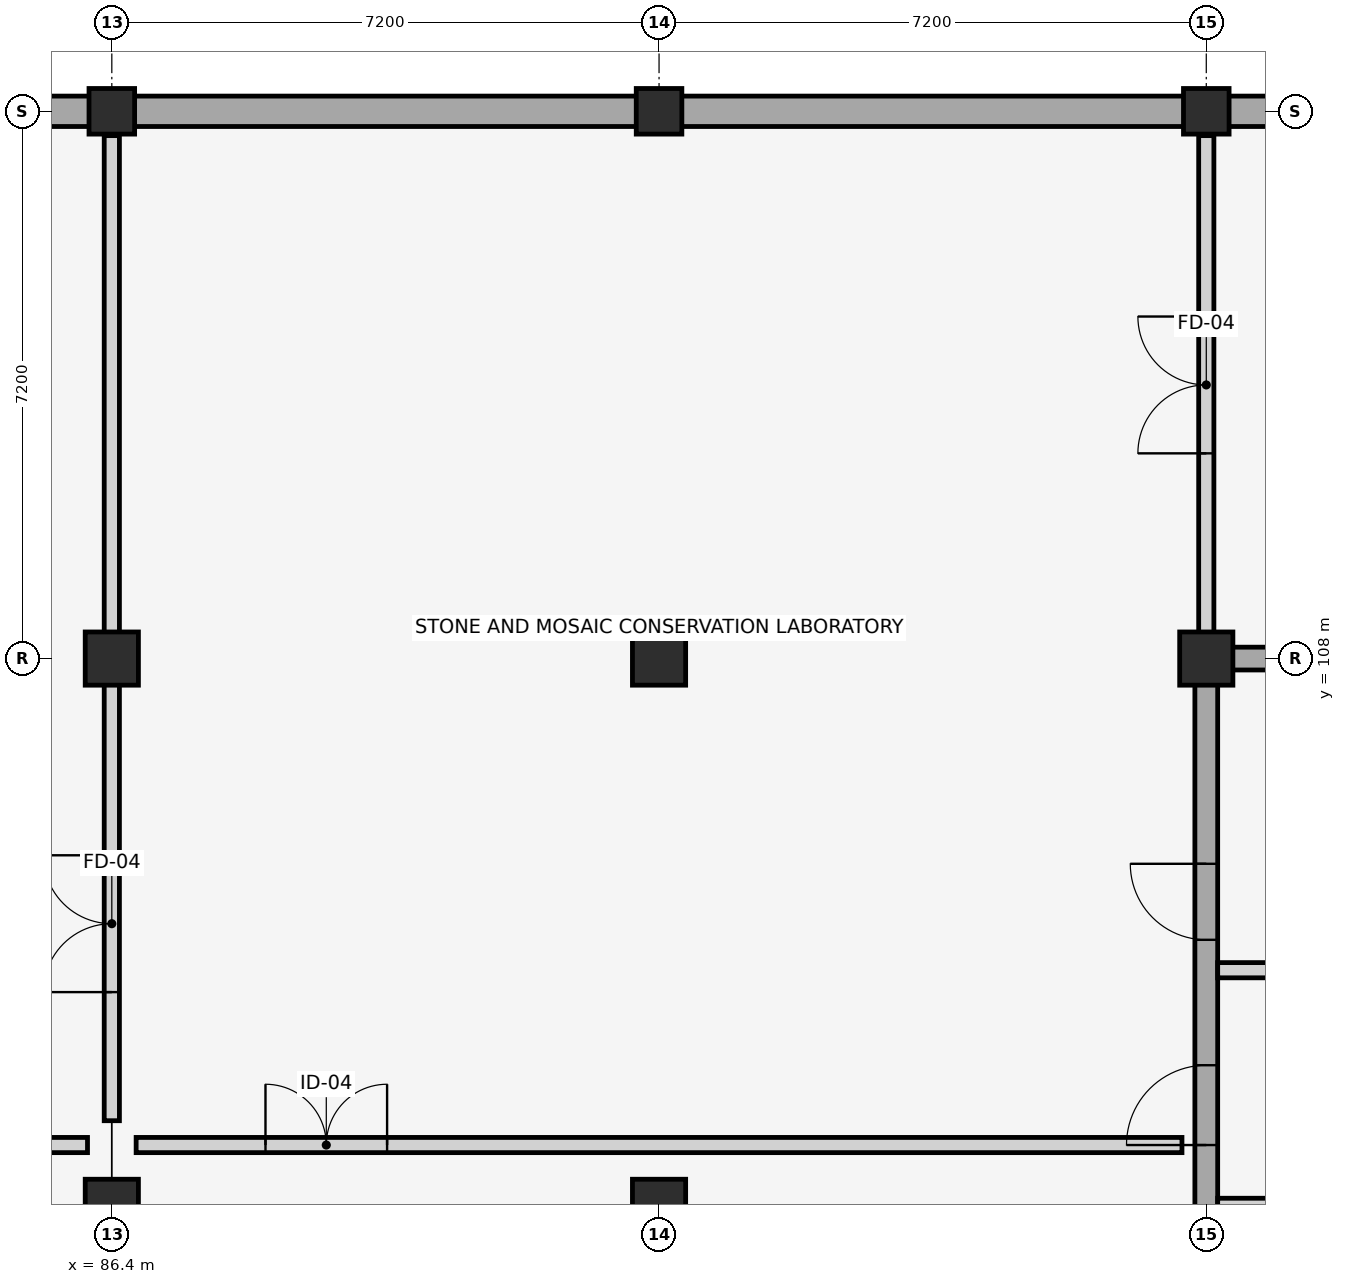
"""IFC4 building model, lengths in metres.
Left out: names, types, materials, properties, quantities, classifications, styles, units other than length and angle.
Written with IfcOpenShell. Run it as: python <this file> out.ifc"""

import sys

from ifc_helpers import new_model, si_unit, direction, frame, frame_2d, origin, origin_2d, place, context, subcontext, project, spatial, rectangle, extrude, element, fill, save


model = new_model("IFC4")
c1 = context("Model", 3, precision=1e-05, world=origin(), true_north=direction((0.0, 1.0)))
c2 = subcontext(c1, "Body", "Model", "MODEL_VIEW")
j1 = project(units=[si_unit("LENGTHUNIT", "METRE"), si_unit("PLANEANGLEUNIT", "RADIAN")], contexts=[c1])
p1 = place(None, origin())
s1 = spatial("IfcSite", under=j1, at=p1, CompositionType="ELEMENT")
p2 = place(p1, origin())
s2 = spatial("IfcBuilding", under=s1, at=p2, CompositionType="ELEMENT")
p3 = place(p2, frame((0.0, 0.0, -4.5)))
s3 = spatial("IfcBuildingStorey", under=s2, at=p3, CompositionType="ELEMENT", Elevation=-4.5)
p4 = place(p3, frame((108.2, 115.2, 0.0), z_axis=(0.0, 0.0, 1.0), x_axis=(-1.0, 0.0, 0.0)))
e1 = element("IfcWall", 1, at=p4, inside=s3, PredefinedType="USERDEFINED", context=c2, shape_type="SweptSolid", body=[
    extrude(rectangle(XDim=50.8, YDim=0.4, at=frame_2d((25.4, 0.0))), origin(), (0.0, 0.0, 1.0), 3.67),
])
for number, where, z_axis, x_axis in (
    (2, (86.4, 100.8, -0.45), (0.0, 0.0, 1.0), (1.0, 0.0, 0.0)),
    (3, (86.4, 108.0, -0.45), (0.0, 0.0, 1.0), (0.0, 1.0, 0.0)),
):
    element("IfcColumn", number, at=place(p3, frame(where, z_axis=z_axis, x_axis=x_axis)), inside=s3, PredefinedType="COLUMN", context=c2, shape_type="SweptSolid", body=[
        extrude(rectangle(XDim=0.7, YDim=0.7, at=origin_2d()), origin(), (0.0, 0.0, 1.0), 4.95),
    ])
p5 = place(p3, frame((86.4, 115.2, -0.45), z_axis=(0.0, 0.0, 1.0), x_axis=(1.0, 0.0, 0.0)))
e4 = element("IfcColumn", 4, at=p5, inside=s3, PredefinedType="COLUMN", context=c2, shape_type="SweptSolid", body=[
    extrude(rectangle(XDim=0.6, YDim=0.6, at=origin_2d()), origin(), (0.0, 0.0, 1.0), 4.95),
])
for number, where, z_axis, x_axis in (
    (5, (93.6, 100.8, -0.45), (0.0, 0.0, 1.0), (0.0, 1.0, 0.0)),
    (6, (93.6, 108.0, -0.45), (0.0, 0.0, 1.0), (1.0, 0.0, 0.0)),
):
    element("IfcColumn", number, at=place(p3, frame(where, z_axis=z_axis, x_axis=x_axis)), inside=s3, PredefinedType="COLUMN", context=c2, shape_type="SweptSolid", body=[
        extrude(rectangle(XDim=0.7, YDim=0.7, at=origin_2d()), origin(), (0.0, 0.0, 1.0), 4.95),
    ])
p6 = place(p3, frame((93.6, 115.2, -0.45), z_axis=(0.0, 0.0, 1.0), x_axis=(0.0, 1.0, 0.0)))
e7 = element("IfcColumn", 7, at=p6, inside=s3, PredefinedType="COLUMN", context=c2, shape_type="SweptSolid", body=[
    extrude(rectangle(XDim=0.6, YDim=0.6, at=origin_2d()), origin(), (0.0, 0.0, 1.0), 4.95),
])
p7 = place(p3, frame((100.8, 108.0, -0.45), z_axis=(0.0, 0.0, 1.0), x_axis=(0.0, 1.0, 0.0)))
e8 = element("IfcColumn", 8, at=p7, inside=s3, PredefinedType="COLUMN", context=c2, shape_type="SweptSolid", body=[
    extrude(rectangle(XDim=0.7, YDim=0.7, at=origin_2d()), origin(), (0.0, 0.0, 1.0), 4.95),
])
p8 = place(p3, frame((100.8, 115.2, -0.45), z_axis=(0.0, 0.0, 1.0), x_axis=(1.0, 0.0, 0.0)))
e9 = element("IfcColumn", 9, at=p8, inside=s3, PredefinedType="COLUMN", context=c2, shape_type="SweptSolid", body=[
    extrude(rectangle(XDim=0.6, YDim=0.6, at=origin_2d()), origin(), (0.0, 0.0, 1.0), 4.95),
])
p9 = place(p3, frame((100.65, 108.0, 0.0), z_axis=(0.0, 0.0, 1.0), x_axis=(1.0, 0.0, 0.0)))
e10 = element("IfcWall", 10, at=p9, inside=s3, PredefinedType="SHEAR", context=c2, shape_type="SweptSolid", body=[
    extrude(rectangle(XDim=7.15, YDim=0.3, at=frame_2d((3.575, 0.0))), origin(), (0.0, 0.0, 1.0), 4.25),
])
p10 = place(p3, frame((100.8, 93.75, 0.0), z_axis=(0.0, 0.0, 1.0), x_axis=(0.0, 1.0, 0.0)))
e11 = element("IfcWall", 11, at=p10, inside=s3, PredefinedType="SHEAR", context=c2, shape_type="SweptSolid", body=[
    extrude(rectangle(XDim=14.1, YDim=0.3, at=frame_2d((7.05, 0.0))), origin(), (0.0, 0.0, 1.0), 4.25),
])
p11 = place(p10, frame((3.55, 0.0, 0.0)))
e12 = element("IfcOpeningElement", 12, at=p11, cuts=e11, PredefinedType="OPENING", context=c2, shape_type="SweptSolid", body=[
    extrude(rectangle(XDim=1.3, YDim=2.2, at=frame_2d((0.65, 1.1))), frame((0.0, 0.16, 0.0), z_axis=(0.0, -1.0, 0.0), x_axis=(1.0, 0.0, 0.0)), (0.0, 0.0, 1.0), 0.32),
])
p12 = place(p10, frame((7.85, 0.0, 0.0)))
e13 = element("IfcOpeningElement", 13, at=p12, cuts=e11, PredefinedType="OPENING", context=c2, shape_type="SweptSolid", body=[
    extrude(rectangle(XDim=1.05, YDim=2.15, at=frame_2d((0.525, 1.075))), frame((0.0, 0.16, 0.0), z_axis=(0.0, -1.0, 0.0), x_axis=(1.0, 0.0, 0.0)), (0.0, 0.0, 1.0), 0.32),
])
p13 = place(p10, frame((10.55, 0.0, 0.0)))
e14 = element("IfcOpeningElement", 14, at=p13, cuts=e11, PredefinedType="OPENING", context=c2, shape_type="SweptSolid", body=[
    extrude(rectangle(XDim=1.0, YDim=2.15, at=frame_2d((0.5, 1.075))), frame((0.0, 0.16, 0.0), z_axis=(0.0, -1.0, 0.0), x_axis=(1.0, 0.0, 0.0)), (0.0, 0.0, 1.0), 0.32),
])
for number, where, z_axis, x_axis in (
    (15, (100.95, 100.8, 0.0), (0.0, 0.0, 1.0), (1.0, 0.0, 0.0)),
    (16, (100.95, 103.9, 0.0), (0.0, 0.0, 1.0), (1.0, 0.0, 0.0)),
):
    element("IfcWall", number, at=place(p3, frame(where, z_axis=z_axis, x_axis=x_axis)), inside=s3, PredefinedType="PLUMBINGWALL", context=c2, shape_type="SweptSolid", body=[
        extrude(rectangle(XDim=3.55, YDim=0.2, at=frame_2d((1.775, 0.0))), origin(), (0.0, 0.0, 1.0), 3.67),
    ])
p14 = place(p3, frame((65.12, 101.6, 0.0), z_axis=(0.0, 0.0, 1.0), x_axis=(1.0, 0.0, 0.0)))
e17 = element("IfcWall", 17, at=p14, inside=s3, PredefinedType="PARTITIONING", context=c2, shape_type="SweptSolid", body=[
    extrude(rectangle(XDim=20.96, YDim=0.2, at=frame_2d((10.48, 0.0))), origin(), (0.0, 0.0, 1.0), 3.45),
])
p15 = place(p14, frame((9.58, 0.0, 0.0)))
e18 = element("IfcOpeningElement", 18, at=p15, cuts=e17, PredefinedType="OPENING", context=c2, shape_type="SweptSolid", body=[
    extrude(rectangle(XDim=1.8, YDim=2.4, at=frame_2d((0.9, 1.2))), frame((0.0, 0.11, 0.0), z_axis=(0.0, -1.0, 0.0), x_axis=(1.0, 0.0, 0.0)), (0.0, 0.0, 1.0), 0.22),
])
p16 = place(p3, frame((86.72, 101.6, 0.0), z_axis=(0.0, 0.0, 1.0), x_axis=(1.0, 0.0, 0.0)))
e19 = element("IfcWall", 19, at=p16, inside=s3, PredefinedType="PARTITIONING", context=c2, shape_type="SweptSolid", body=[
    extrude(rectangle(XDim=13.76, YDim=0.2, at=frame_2d((6.88, 0.0))), origin(), (0.0, 0.0, 1.0), 3.45),
])
p17 = place(p16, frame((1.702, 0.0, 0.0)))
e20 = element("IfcOpeningElement", 20, at=p17, cuts=e19, PredefinedType="OPENING", context=c2, shape_type="SweptSolid", body=[
    extrude(rectangle(XDim=1.6, YDim=2.35, at=frame_2d((0.8, 1.175))), frame((0.0, 0.11, 0.0), z_axis=(0.0, -1.0, 0.0), x_axis=(1.0, 0.0, 0.0)), (0.0, 0.0, 1.0), 0.22),
])
p18 = place(p3, frame((86.4, 101.92, 0.0), z_axis=(0.0, 0.0, 1.0), x_axis=(0.0, 1.0, 0.0)))
e21 = element("IfcWall", 21, at=p18, inside=s3, PredefinedType="PARTITIONING", context=c2, shape_type="SweptSolid", body=[
    extrude(rectangle(XDim=12.96, YDim=0.2, at=frame_2d((6.48, 0.0))), origin(), (0.0, 0.0, 1.0), 3.45),
])
p19 = place(p18, frame((1.692, 0.0, 0.0)))
e22 = element("IfcOpeningElement", 22, at=p19, cuts=e21, PredefinedType="OPENING", context=c2, shape_type="SweptSolid", body=[
    extrude(rectangle(XDim=1.8, YDim=2.4, at=frame_2d((0.9, 1.2))), frame((0.0, 0.11, 0.0), z_axis=(0.0, -1.0, 0.0), x_axis=(1.0, 0.0, 0.0)), (0.0, 0.0, 1.0), 0.22),
])
p20 = place(p3, frame((100.8, 108.32, 0.0), z_axis=(0.0, 0.0, 1.0), x_axis=(0.0, 1.0, 0.0)))
e23 = element("IfcWall", 23, at=p20, inside=s3, PredefinedType="PARTITIONING", context=c2, shape_type="SweptSolid", body=[
    extrude(rectangle(XDim=6.56, YDim=0.2, at=frame_2d((3.28, 0.0))), origin(), (0.0, 0.0, 1.0), 3.45),
])
p21 = place(p20, frame((2.38, 0.0, 0.0)))
e24 = element("IfcOpeningElement", 24, at=p21, cuts=e23, PredefinedType="OPENING", context=c2, shape_type="SweptSolid", body=[
    extrude(rectangle(XDim=1.8, YDim=2.4, at=frame_2d((0.9, 1.2))), frame((0.0, 0.11, 0.0), z_axis=(0.0, -1.0, 0.0), x_axis=(1.0, 0.0, 0.0)), (0.0, 0.0, 1.0), 0.22),
])
p22 = place(p12, origin())
e25 = element("IfcDoor", 25, at=p22, inside=s3, OperationType="SINGLE_SWING_LEFT", PredefinedType="DOOR", context=c2, shape_type="SweptSolid", body=[
    extrude(rectangle(XDim=1.05, YDim=2.15, at=frame_2d((0.525, 1.075))), frame((0.0, 0.025, 0.0), z_axis=(0.0, -1.0, 0.0), x_axis=(1.0, 0.0, 0.0)), (0.0, 0.0, 1.0), 0.05),
])
fill(e13, e25)
p23 = place(p13, origin())
e26 = element("IfcDoor", 26, at=p23, inside=s3, OperationType="SINGLE_SWING_RIGHT", PredefinedType="DOOR", context=c2, shape_type="SweptSolid", body=[
    extrude(rectangle(XDim=1.0, YDim=2.15, at=frame_2d((0.5, 1.075))), frame((0.0, 0.025, 0.0), z_axis=(0.0, -1.0, 0.0), x_axis=(1.0, 0.0, 0.0)), (0.0, 0.0, 1.0), 0.05),
])
fill(e14, e26)
p24 = place(p17, origin())
e27 = element("IfcDoor", 27, at=p24, inside=s3, OperationType="DOUBLE_DOOR_SINGLE_SWING", PredefinedType="DOOR", context=c2, shape_type="SweptSolid", body=[
    extrude(rectangle(XDim=1.6, YDim=2.35, at=frame_2d((0.8, 1.175))), frame((0.0, 0.025, 0.0), z_axis=(0.0, -1.0, 0.0), x_axis=(1.0, 0.0, 0.0)), (0.0, 0.0, 1.0), 0.05),
])
fill(e20, e27)
p25 = place(p19, origin())
e28 = element("IfcDoor", 28, at=p25, inside=s3, OperationType="DOUBLE_DOOR_SINGLE_SWING", PredefinedType="DOOR", context=c2, shape_type="SweptSolid", body=[
    extrude(rectangle(XDim=1.8, YDim=2.4, at=frame_2d((0.9, 1.2))), frame((0.0, 0.025, 0.0), z_axis=(0.0, -1.0, 0.0), x_axis=(1.0, 0.0, 0.0)), (0.0, 0.0, 1.0), 0.05),
])
fill(e22, e28)
p26 = place(p21, origin())
e29 = element("IfcDoor", 29, at=p26, inside=s3, OperationType="DOUBLE_DOOR_SINGLE_SWING", PredefinedType="DOOR", context=c2, shape_type="SweptSolid", body=[
    extrude(rectangle(XDim=1.8, YDim=2.4, at=frame_2d((0.9, 1.2))), frame((0.0, 0.025, 0.0), z_axis=(0.0, -1.0, 0.0), x_axis=(1.0, 0.0, 0.0)), (0.0, 0.0, 1.0), 0.05),
])
fill(e24, e29)
save(model, sys.argv[1])
